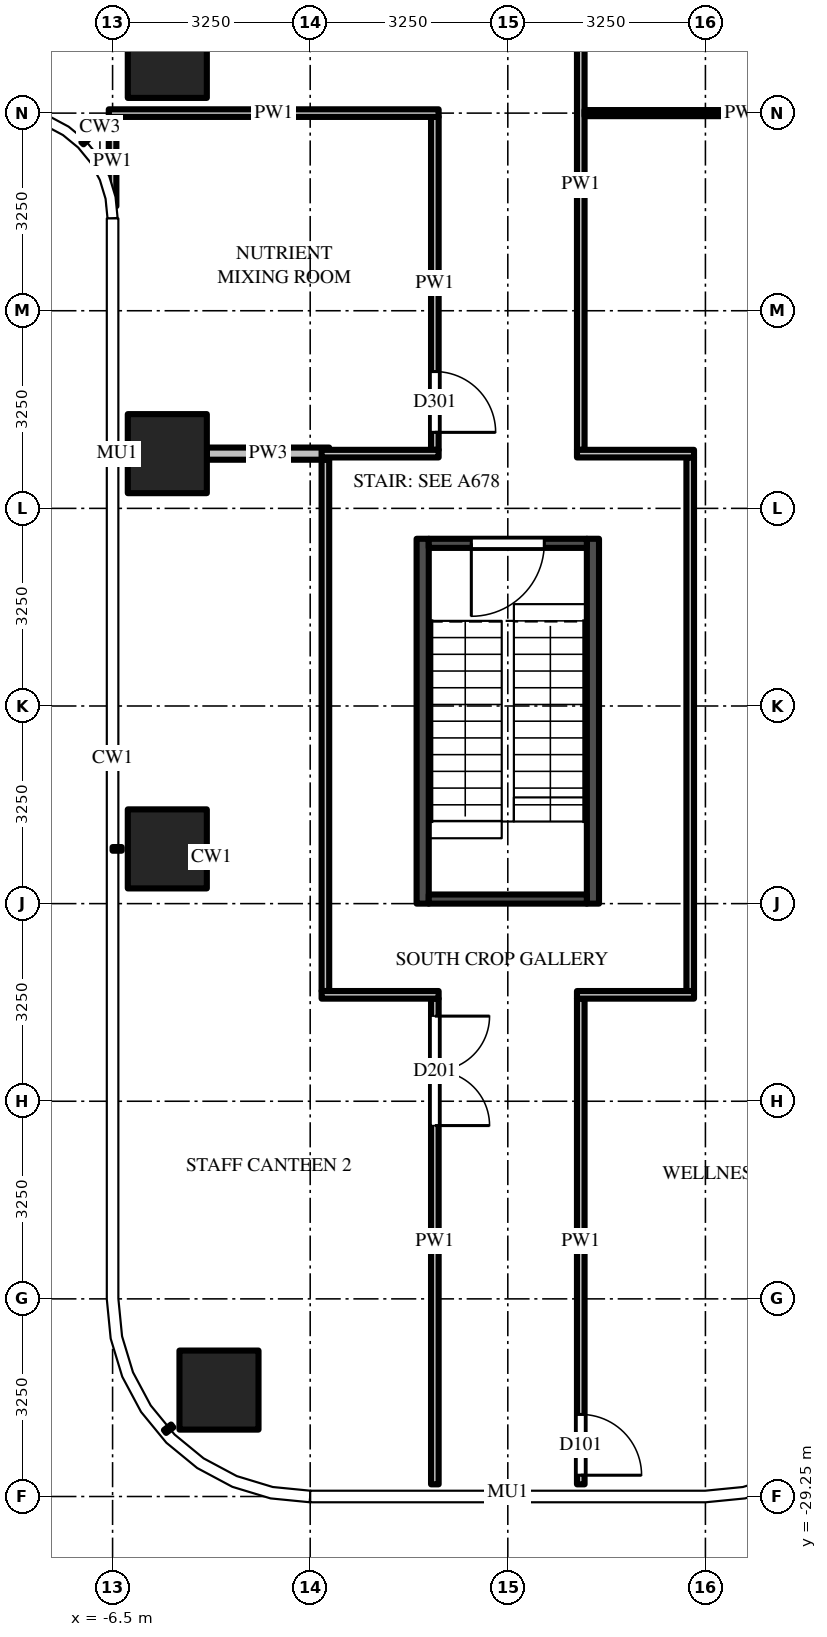
"""IFC4 building model, lengths in metres.
Left out: names, types, materials, properties, quantities, classifications, styles, units other than length and angle.
Written with IfcOpenShell. Run it as: python <this file> out.ifc"""

import sys

from ifc_helpers import new_model, si_unit, direction, frame, frame_2d, origin, origin_2d, place, context, subcontext, project, spatial, rectangle, extrude, source, transform, mapped, element, fill, save


model = new_model("IFC4")
c1 = context("Model", 3, precision=1e-05, world=origin(), true_north=direction((0.0, 1.0)))
c2 = subcontext(c1, "Body", "Model", "MODEL_VIEW")
j1 = project(units=[si_unit("LENGTHUNIT", "METRE"), si_unit("PLANEANGLEUNIT", "RADIAN")], contexts=[c1])
p1 = place(None, origin())
s1 = spatial("IfcSite", under=j1, at=p1, CompositionType="ELEMENT")
p2 = place(p1, origin())
s2 = spatial("IfcBuilding", under=s1, at=p2, CompositionType="ELEMENT")
p3 = place(p2, frame((0.0, 0.0, 120.0)))
s3 = spatial("IfcBuildingStorey", under=s2, at=p3, CompositionType="ELEMENT", Elevation=120.0)
m1 = source(origin(), c2, "Body", "SweptSolid", [
    extrude(rectangle(XDim=1.3, YDim=1.3, at=origin_2d()), origin(), (0.0, 0.0, 1.0), 4.5),
])
for number, where, z_axis, x_axis in (
    (1, (-5.6, -5.6, 0.0), (0.0, 0.0, 1.0), (1.0, 0.0, 0.0)),
    (2, (-5.6, -12.1, 0.0), (0.0, 0.0, 1.0), (1.0, 0.0, 0.0)),
    (3, (-5.6, -18.6, 0.0), (0.0, 0.0, 1.0), (1.0, 0.0, 0.0)),
    (4, (-4.75, -27.5, 0.0), (0.0, 0.0, 1.0), (1.0, 0.0, 0.0)),
):
    element("IfcColumn", number, at=place(p3, frame(where, z_axis=z_axis, x_axis=x_axis)), inside=s3, PredefinedType="COLUMN", context=c2, shape_type="MappedRepresentation", body=[
        mapped(m1, transform((0.0, 0.0, 0.0))),
    ])
m2 = source(origin(), c2, "Body", "SweptSolid", [
    extrude(rectangle(XDim=6.0, YDim=0.2, at=frame_2d((3.0, 0.0))), origin(), (0.0, 0.0, 1.0), 4.25),
])
for number, where, z_axis, x_axis in (
    (5, (1.4, -13.5, 0.0), (0.0, 0.0, 1.0), (0.0, -1.0, 0.0)),
    (6, (-1.4, -13.5, 0.0), (0.0, 0.0, 1.0), (0.0, -1.0, 0.0)),
):
    element("IfcWall", number, at=place(p3, frame(where, z_axis=z_axis, x_axis=x_axis)), inside=s3, PredefinedType="SHEAR", context=c2, shape_type="MappedRepresentation", body=[
        mapped(m2, transform((0.0, 0.0, 0.0))),
    ])
m3 = source(origin(), c2, "Body", "SweptSolid", [
    extrude(rectangle(XDim=2.6, YDim=0.15, at=frame_2d((1.3, 0.0))), origin(), (0.0, 0.0, 1.0), 4.25),
])
p4 = place(p3, frame((1.3, -13.575, 0.0), z_axis=(0.0, 0.0, 1.0), x_axis=(-1.0, 0.0, 0.0)))
e7 = element("IfcWall", 7, at=p4, inside=s3, PredefinedType="SHEAR", context=c2, shape_type="MappedRepresentation", body=[
    mapped(m3, transform((0.0, 0.0, 0.0))),
])
m4 = source(origin(), c2, "Body", "SweptSolid", [
    extrude(rectangle(XDim=1.2, YDim=2.1, at=frame_2d((0.6, 1.05))), frame((0.0, 0.085, 0.0), z_axis=(0.0, -1.0, 0.0), x_axis=(1.0, 0.0, 0.0)), (0.0, 0.0, 1.0), 0.17),
])
p5 = place(p4, frame((0.7, 0.0, 0.0)))
e8 = element("IfcOpeningElement", 8, at=p5, cuts=e7, PredefinedType="OPENING", context=c2, shape_type="MappedRepresentation", body=[
    mapped(m4, transform((0.0, 0.0, 0.0))),
])
p6 = place(p3, frame((1.3, -19.425, 0.0), z_axis=(0.0, 0.0, 1.0), x_axis=(-1.0, 0.0, 0.0)))
e9 = element("IfcWall", 9, at=p6, inside=s3, PredefinedType="SHEAR", context=c2, shape_type="MappedRepresentation", body=[
    mapped(m3, transform((0.0, 0.0, 0.0))),
])
m5 = source(origin(), c2, "Body", "SweptSolid", [
    extrude(rectangle(XDim=1.469, YDim=0.125, at=frame_2d((0.734, 0.0))), origin(), (0.0, 0.0, 1.0), 4.25),
])
p7 = place(p3, frame((-6.5, -6.562, 0.0), z_axis=(0.0, 0.0, 1.0), x_axis=(0.0, -1.0, 0.0)))
e10 = element("IfcWall", 10, at=p7, inside=s3, PredefinedType="PARTITIONING", context=c2, shape_type="MappedRepresentation", body=[
    mapped(m5, transform((0.0, 0.0, 0.0))),
])
m6 = source(origin(), c2, "Body", "SweptSolid", [
    extrude(rectangle(XDim=8.738, YDim=0.125, at=frame_2d((4.369, 0.0))), origin(), (0.0, 0.0, 1.0), 3.468),
])
p8 = place(p3, frame((-3.0, -20.938, 0.0), z_axis=(0.0, 0.0, 1.0), x_axis=(0.0, 1.0, 0.0)))
e11 = element("IfcWall", 11, at=p8, inside=s3, PredefinedType="PARTITIONING", context=c2, shape_type="MappedRepresentation", body=[
    mapped(m6, transform((0.0, 0.0, 0.0))),
])
m7 = source(origin(), c2, "Body", "SweptSolid", [
    extrude(rectangle(XDim=7.988, YDim=0.125, at=frame_2d((3.994, 0.0))), origin(), (0.0, 0.0, 1.0), 3.33),
])
p9 = place(p3, frame((-1.2, -21.062, 0.0), z_axis=(0.0, 0.0, 1.0), x_axis=(0.0, -1.0, 0.0)))
e12 = element("IfcWall", 12, at=p9, inside=s3, PredefinedType="PARTITIONING", context=c2, shape_type="MappedRepresentation", body=[
    mapped(m7, transform((0.0, 0.0, 0.0))),
])
m8 = source(origin(), c2, "Body", "SweptSolid", [
    extrude(rectangle(XDim=1.8, YDim=2.1, at=frame_2d((0.9, 1.05))), frame((0.0, 0.073, 0.0), z_axis=(0.0, -1.0, 0.0), x_axis=(1.0, 0.0, 0.0)), (0.0, 0.0, 1.0), 0.145),
])
p10 = place(p9, frame((0.288, 0.0, 0.0)))
e13 = element("IfcOpeningElement", 13, at=p10, cuts=e12, PredefinedType="OPENING", context=c2, shape_type="MappedRepresentation", body=[
    mapped(m8, transform((0.0, 0.0, 0.0))),
])
m9 = source(origin(), c2, "Body", "SweptSolid", [
    extrude(rectangle(XDim=5.475, YDim=0.125, at=frame_2d((2.738, 0.0))), origin(), (0.0, 0.0, 1.0), 3.468),
])
p11 = place(p3, frame((-1.2, -6.562, 0.0), z_axis=(0.0, 0.0, 1.0), x_axis=(0.0, -1.0, 0.0)))
e14 = element("IfcWall", 14, at=p11, inside=s3, PredefinedType="PARTITIONING", context=c2, shape_type="MappedRepresentation", body=[
    mapped(m9, transform((0.0, 0.0, 0.0))),
])
m10 = source(origin(), c2, "Body", "SweptSolid", [
    extrude(rectangle(XDim=1.0, YDim=2.1, at=frame_2d((0.5, 1.05))), frame((0.0, 0.073, 0.0), z_axis=(0.0, -1.0, 0.0), x_axis=(1.0, 0.0, 0.0)), (0.0, 0.0, 1.0), 0.145),
])
p12 = place(p11, frame((4.188, 0.0, 0.0)))
e15 = element("IfcOpeningElement", 15, at=p12, cuts=e14, PredefinedType="OPENING", context=c2, shape_type="MappedRepresentation", body=[
    mapped(m10, transform((0.0, 0.0, 0.0))),
])
p13 = place(p3, frame((1.2, -21.062, 0.0), z_axis=(0.0, 0.0, 1.0), x_axis=(0.0, -1.0, 0.0)))
e16 = element("IfcWall", 16, at=p13, inside=s3, PredefinedType="PARTITIONING", context=c2, shape_type="MappedRepresentation", body=[
    mapped(m7, transform((0.0, 0.0, 0.0))),
])
p14 = place(p13, frame((6.837, 0.0, 0.0)))
e17 = element("IfcOpeningElement", 17, at=p14, cuts=e16, PredefinedType="OPENING", context=c2, shape_type="MappedRepresentation", body=[
    mapped(m10, transform((0.0, 0.0, 0.0))),
])
m11 = source(origin(), c2, "Body", "SweptSolid", [
    extrude(rectangle(XDim=8.725, YDim=0.125, at=frame_2d((4.363, 0.0))), origin(), (0.0, 0.0, 1.0), 3.468),
])
p15 = place(p3, frame((1.2, -3.312, 0.0), z_axis=(0.0, 0.0, 1.0), x_axis=(0.0, -1.0, 0.0)))
e18 = element("IfcWall", 18, at=p15, inside=s3, PredefinedType="PARTITIONING", context=c2, shape_type="MappedRepresentation", body=[
    mapped(m11, transform((0.0, 0.0, 0.0))),
])
m12 = source(origin(), c2, "Body", "SweptSolid", [
    extrude(rectangle(XDim=8.775, YDim=0.125, at=frame_2d((4.387, 0.0))), origin(), (0.0, 0.0, 1.0), 3.468),
])
p16 = place(p3, frame((3.0, -12.163, 0.0), z_axis=(0.0, 0.0, 1.0), x_axis=(0.0, -1.0, 0.0)))
e19 = element("IfcWall", 19, at=p16, inside=s3, PredefinedType="PARTITIONING", context=c2, shape_type="MappedRepresentation", body=[
    mapped(m12, transform((0.0, 0.0, 0.0))),
])
m13 = source(origin(), c2, "Body", "SweptSolid", [
    extrude(rectangle(XDim=1.925, YDim=0.125, at=frame_2d((0.962, 0.0))), origin(), (0.0, 0.0, 1.0), 4.25),
])
for number, where, z_axis, x_axis in (
    (20, (-1.137, -21.0, 0.0), (0.0, 0.0, 1.0), (-1.0, 0.0, 0.0)),
    (21, (3.062, -21.0, 0.0), (0.0, 0.0, 1.0), (-1.0, 0.0, 0.0)),
):
    element("IfcWall", number, at=place(p3, frame(where, z_axis=z_axis, x_axis=x_axis)), inside=s3, PredefinedType="PARTITIONING", context=c2, shape_type="MappedRepresentation", body=[
        mapped(m13, transform((0.0, 0.0, 0.0))),
    ])
m14 = source(origin(), c2, "Body", "SweptSolid", [
    extrude(rectangle(XDim=2.012, YDim=0.2, at=frame_2d((1.006, 0.0))), origin(), (0.0, 0.0, 1.0), 3.468),
])
p17 = place(p3, frame((-4.95, -12.1, 0.0), z_axis=(0.0, 0.0, 1.0), x_axis=(1.0, 0.0, 0.0)))
e22 = element("IfcWall", 22, at=p17, inside=s3, PredefinedType="PARTITIONING", context=c2, shape_type="MappedRepresentation", body=[
    mapped(m14, transform((0.0, 0.0, 0.0))),
])
m15 = source(origin(), c2, "Body", "SweptSolid", [
    extrude(rectangle(XDim=1.925, YDim=0.125, at=frame_2d((0.962, 0.0))), origin(), (0.0, 0.0, 1.0), 3.468),
])
for number, where, z_axis, x_axis in (
    (23, (-3.062, -12.1, 0.0), (0.0, 0.0, 1.0), (1.0, 0.0, 0.0)),
    (24, (1.137, -12.1, 0.0), (0.0, 0.0, 1.0), (1.0, 0.0, 0.0)),
):
    element("IfcWall", number, at=place(p3, frame(where, z_axis=z_axis, x_axis=x_axis)), inside=s3, PredefinedType="PARTITIONING", context=c2, shape_type="MappedRepresentation", body=[
        mapped(m15, transform((0.0, 0.0, 0.0))),
    ])
m16 = source(origin(), c2, "Body", "SweptSolid", [
    extrude(rectangle(XDim=5.238, YDim=0.1, at=frame_2d((2.619, 0.0))), origin(), (0.0, 0.0, 1.0), 3.33),
])
p18 = place(p3, frame((1.262, -6.5, 0.0), z_axis=(0.0, 0.0, 1.0), x_axis=(1.0, 0.0, 0.0)))
e25 = element("IfcWall", 25, at=p18, inside=s3, PredefinedType="PARTITIONING", context=c2, shape_type="MappedRepresentation", body=[
    mapped(m16, transform((0.0, 0.0, 0.0))),
])
m17 = source(origin(), c2, "Body", "SweptSolid", [
    extrude(rectangle(XDim=5.425, YDim=0.125, at=frame_2d((2.712, 0.0))), origin(), (0.0, 0.0, 1.0), 3.33),
])
p19 = place(p3, frame((-1.137, -6.5, 0.0), z_axis=(0.0, 0.0, 1.0), x_axis=(-1.0, 0.0, 0.0)))
e26 = element("IfcWall", 26, at=p19, inside=s3, PredefinedType="PARTITIONING", context=c2, shape_type="MappedRepresentation", body=[
    mapped(m17, transform((0.0, 0.0, 0.0))),
])
m18 = source(origin(), c2, "Body", "SweptSolid", [
    extrude(rectangle(XDim=1.2, YDim=2.1, at=frame_2d((0.6, 1.05))), frame((0.0, 0.025, 0.0), z_axis=(0.0, -1.0, 0.0), x_axis=(1.0, 0.0, 0.0)), (0.0, 0.0, 1.0), 0.05),
])
p20 = place(p5, origin())
e27 = element("IfcDoor", 27, at=p20, inside=s3, OperationType="SINGLE_SWING_RIGHT", PredefinedType="DOOR", context=c2, shape_type="MappedRepresentation", body=[
    mapped(m18, transform((0.0, 0.0, 0.0))),
])
fill(e8, e27)
m19 = source(origin(), c2, "Body", "SweptSolid", [
    extrude(rectangle(XDim=1.0, YDim=2.1, at=frame_2d((0.5, 1.05))), frame((0.0, 0.025, 0.0), z_axis=(0.0, -1.0, 0.0), x_axis=(1.0, 0.0, 0.0)), (0.0, 0.0, 1.0), 0.05),
])
p21 = place(p14, origin())
e28 = element("IfcDoor", 28, at=p21, inside=s3, OperationType="SINGLE_SWING_RIGHT", PredefinedType="DOOR", context=c2, shape_type="MappedRepresentation", body=[
    mapped(m19, transform((0.0, 0.0, 0.0))),
])
fill(e17, e28)
m20 = source(origin(), c2, "Body", "SweptSolid", [
    extrude(rectangle(XDim=1.8, YDim=2.1, at=frame_2d((0.9, 1.05))), frame((0.0, 0.025, 0.0), z_axis=(0.0, -1.0, 0.0), x_axis=(1.0, 0.0, 0.0)), (0.0, 0.0, 1.0), 0.05),
])
p22 = place(p10, origin())
e29 = element("IfcDoor", 29, at=p22, inside=s3, OperationType="DOUBLE_DOOR_SINGLE_SWING", PredefinedType="DOOR", context=c2, shape_type="MappedRepresentation", body=[
    mapped(m20, transform((0.0, 0.0, 0.0))),
])
fill(e13, e29)
p23 = place(p12, origin())
e30 = element("IfcDoor", 30, at=p23, inside=s3, OperationType="SINGLE_SWING_RIGHT", PredefinedType="DOOR", context=c2, shape_type="MappedRepresentation", body=[
    mapped(m19, transform((0.0, 0.0, 0.0))),
])
fill(e15, e30)
save(model, sys.argv[1])
